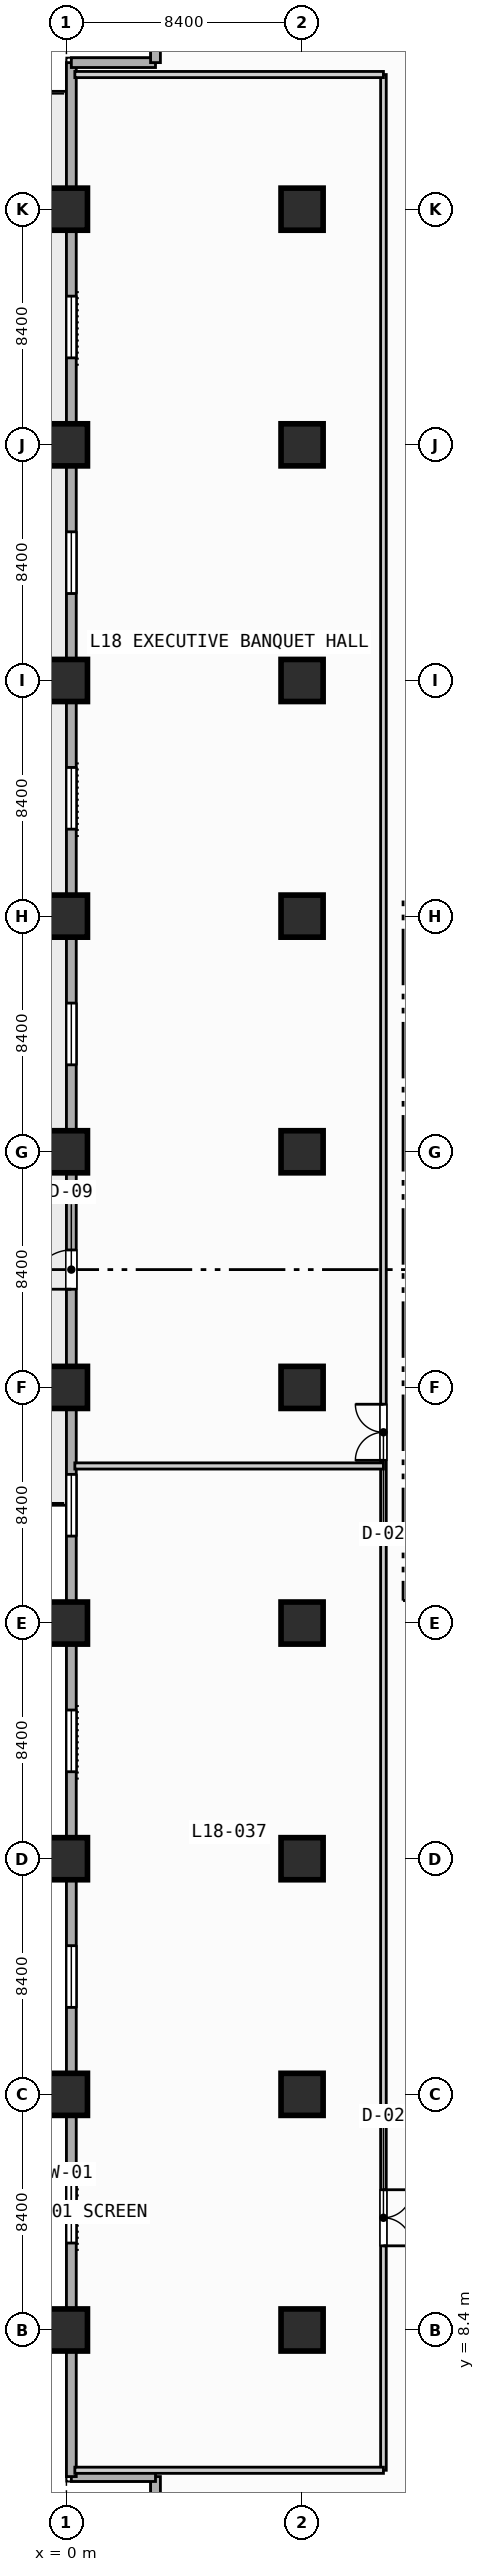
"""IFC4 building model, lengths in metres.
Left out: names, types, materials, properties, quantities, classifications, styles, units other than length and angle.
Written with IfcOpenShell. Run it as: python <this file> out.ifc"""

import sys

from ifc_helpers import new_model, si_unit, direction, frame, frame_2d, origin, origin_2d, place, context, subcontext, project, spatial, rectangle, extrude, element, fill, save


model = new_model("IFC4")
c1 = context("Model", 3, precision=1e-05, world=origin(), true_north=direction((0.0, 1.0)))
c2 = subcontext(c1, "Body", "Model", "MODEL_VIEW")
j1 = project(units=[si_unit("LENGTHUNIT", "METRE"), si_unit("PLANEANGLEUNIT", "RADIAN")], contexts=[c1])
p1 = place(None, origin())
s1 = spatial("IfcSite", under=j1, at=p1, CompositionType="ELEMENT")
p2 = place(p1, origin())
s2 = spatial("IfcBuilding", under=s1, at=p2, CompositionType="ELEMENT")
p3 = place(p2, frame((0.0, 0.0, 77.6)))
s3 = spatial("IfcBuildingStorey", under=s2, at=p3, CompositionType="ELEMENT", Elevation=77.6)
for number, where, z_axis, x_axis in (
    (1, (0.0, 8.4, 0.0), (0.0, 0.0, 1.0), (1.0, 0.0, 0.0)),
    (2, (0.0, 16.8, 0.0), (0.0, 0.0, 1.0), (1.0, 0.0, 0.0)),
    (3, (0.0, 25.2, 0.0), (0.0, 0.0, 1.0), (1.0, 0.0, 0.0)),
    (4, (0.0, 33.6, 0.0), (0.0, 0.0, 1.0), (1.0, 0.0, 0.0)),
    (5, (0.0, 42.0, 0.0), (0.0, 0.0, 1.0), (1.0, 0.0, 0.0)),
    (6, (0.0, 50.4, 0.0), (0.0, 0.0, 1.0), (1.0, 0.0, 0.0)),
    (7, (0.0, 58.8, 0.0), (0.0, 0.0, 1.0), (1.0, 0.0, 0.0)),
    (8, (0.0, 67.2, 0.0), (0.0, 0.0, 1.0), (1.0, 0.0, 0.0)),
    (9, (0.0, 75.6, 0.0), (0.0, 0.0, 1.0), (1.0, 0.0, 0.0)),
    (10, (0.0, 84.0, 0.0), (0.0, 0.0, 1.0), (1.0, 0.0, 0.0)),
    (11, (8.4, 8.4, 0.0), (0.0, 0.0, 1.0), (1.0, 0.0, 0.0)),
    (12, (8.4, 16.8, 0.0), (0.0, 0.0, 1.0), (1.0, 0.0, 0.0)),
    (13, (8.4, 25.2, 0.0), (0.0, 0.0, 1.0), (1.0, 0.0, 0.0)),
    (14, (8.4, 33.6, 0.0), (0.0, 0.0, 1.0), (1.0, 0.0, 0.0)),
    (15, (8.4, 42.0, 0.0), (0.0, 0.0, 1.0), (1.0, 0.0, 0.0)),
    (16, (8.4, 50.4, 0.0), (0.0, 0.0, 1.0), (1.0, 0.0, 0.0)),
    (17, (8.4, 58.8, 0.0), (0.0, 0.0, 1.0), (1.0, 0.0, 0.0)),
    (18, (8.4, 67.2, 0.0), (0.0, 0.0, 1.0), (1.0, 0.0, 0.0)),
    (19, (8.4, 75.6, 0.0), (0.0, 0.0, 1.0), (1.0, 0.0, 0.0)),
    (20, (8.4, 84.0, 0.0), (0.0, 0.0, 1.0), (1.0, 0.0, 0.0)),
):
    element("IfcColumn", number, at=place(p3, frame(where, z_axis=z_axis, x_axis=x_axis)), inside=s3, PredefinedType="COLUMN", context=c2, shape_type="SweptSolid", body=[
        extrude(rectangle(XDim=1.5, YDim=1.5, at=origin_2d()), origin(), (0.0, 0.0, 1.0), 3.8),
    ])
for number, where, z_axis, x_axis in (
    (21, (3.175, 0.175, 0.0), (0.0, 0.0, 1.0), (0.0, 1.0, 0.0)),
    (22, (3.175, 3.175, 0.0), (0.0, 0.0, 1.0), (-1.0, 0.0, 0.0)),
):
    element("IfcWall", number, at=place(p3, frame(where, z_axis=z_axis, x_axis=x_axis)), inside=s3, PredefinedType="STANDARD", context=c2, shape_type="SweptSolid", body=[
        extrude(rectangle(XDim=3.0, YDim=0.35, at=frame_2d((1.5, 0.0))), origin(), (0.0, 0.0, 1.0), 3.55),
    ])
p4 = place(p3, frame((0.175, 3.175, 0.0), z_axis=(0.0, 0.0, 1.0), x_axis=(0.0, 1.0, 0.0)))
e23 = element("IfcWall", 23, at=p4, inside=s3, PredefinedType="STANDARD", context=c2, shape_type="SweptSolid", body=[
    extrude(rectangle(XDim=86.05, YDim=0.35, at=frame_2d((43.025, 0.0))), origin(), (0.0, 0.0, 1.0), 3.55),
])
p5 = place(p4, frame((42.325, 0.0, 0.0)))
e24 = element("IfcOpeningElement", 24, at=p5, cuts=e23, PredefinedType="OPENING", context=c2, shape_type="SweptSolid", body=[
    extrude(rectangle(XDim=1.4, YDim=2.2, at=frame_2d((0.7, 1.1))), frame((0.0, 0.185, 0.0), z_axis=(0.0, -1.0, 0.0), x_axis=(1.0, 0.0, 0.0)), (0.0, 0.0, 1.0), 0.37),
])
p6 = place(p4, frame((8.325, 0.0, 0.85)))
e25 = element("IfcOpeningElement", 25, at=p6, cuts=e23, PredefinedType="OPENING", context=c2, shape_type="SweptSolid", body=[
    extrude(rectangle(XDim=2.2, YDim=1.8, at=frame_2d((1.1, 0.9))), frame((0.0, 0.185, 0.0), z_axis=(0.0, -1.0, 0.0), x_axis=(1.0, 0.0, 0.0)), (0.0, 0.0, 1.0), 0.37),
])
p7 = place(p4, frame((16.725, 0.0, 0.85)))
e26 = element("IfcOpeningElement", 26, at=p7, cuts=e23, PredefinedType="OPENING", context=c2, shape_type="SweptSolid", body=[
    extrude(rectangle(XDim=2.2, YDim=1.8, at=frame_2d((1.1, 0.9))), frame((0.0, 0.185, 0.0), z_axis=(0.0, -1.0, 0.0), x_axis=(1.0, 0.0, 0.0)), (0.0, 0.0, 1.0), 0.37),
])
p8 = place(p4, frame((25.125, 0.0, 0.85)))
e27 = element("IfcOpeningElement", 27, at=p8, cuts=e23, PredefinedType="OPENING", context=c2, shape_type="SweptSolid", body=[
    extrude(rectangle(XDim=2.2, YDim=1.8, at=frame_2d((1.1, 0.9))), frame((0.0, 0.185, 0.0), z_axis=(0.0, -1.0, 0.0), x_axis=(1.0, 0.0, 0.0)), (0.0, 0.0, 1.0), 0.37),
])
p9 = place(p4, frame((33.525, 0.0, 0.85)))
e28 = element("IfcOpeningElement", 28, at=p9, cuts=e23, PredefinedType="OPENING", context=c2, shape_type="SweptSolid", body=[
    extrude(rectangle(XDim=2.2, YDim=1.8, at=frame_2d((1.1, 0.9))), frame((0.0, 0.185, 0.0), z_axis=(0.0, -1.0, 0.0), x_axis=(1.0, 0.0, 0.0)), (0.0, 0.0, 1.0), 0.37),
])
p10 = place(p4, frame((50.325, 0.0, 0.85)))
e29 = element("IfcOpeningElement", 29, at=p10, cuts=e23, PredefinedType="OPENING", context=c2, shape_type="SweptSolid", body=[
    extrude(rectangle(XDim=2.2, YDim=1.8, at=frame_2d((1.1, 0.9))), frame((0.0, 0.185, 0.0), z_axis=(0.0, -1.0, 0.0), x_axis=(1.0, 0.0, 0.0)), (0.0, 0.0, 1.0), 0.37),
])
p11 = place(p4, frame((58.725, 0.0, 0.85)))
e30 = element("IfcOpeningElement", 30, at=p11, cuts=e23, PredefinedType="OPENING", context=c2, shape_type="SweptSolid", body=[
    extrude(rectangle(XDim=2.2, YDim=1.8, at=frame_2d((1.1, 0.9))), frame((0.0, 0.185, 0.0), z_axis=(0.0, -1.0, 0.0), x_axis=(1.0, 0.0, 0.0)), (0.0, 0.0, 1.0), 0.37),
])
p12 = place(p4, frame((67.125, 0.0, 0.85)))
e31 = element("IfcOpeningElement", 31, at=p12, cuts=e23, PredefinedType="OPENING", context=c2, shape_type="SweptSolid", body=[
    extrude(rectangle(XDim=2.2, YDim=1.8, at=frame_2d((1.1, 0.9))), frame((0.0, 0.185, 0.0), z_axis=(0.0, -1.0, 0.0), x_axis=(1.0, 0.0, 0.0)), (0.0, 0.0, 1.0), 0.37),
])
p13 = place(p4, frame((75.525, 0.0, 0.85)))
e32 = element("IfcOpeningElement", 32, at=p13, cuts=e23, PredefinedType="OPENING", context=c2, shape_type="SweptSolid", body=[
    extrude(rectangle(XDim=2.2, YDim=1.8, at=frame_2d((1.1, 0.9))), frame((0.0, 0.185, 0.0), z_axis=(0.0, -1.0, 0.0), x_axis=(1.0, 0.0, 0.0)), (0.0, 0.0, 1.0), 0.37),
])
for number, where, z_axis, x_axis in (
    (33, (0.175, 89.225, 0.0), (0.0, 0.0, 1.0), (1.0, 0.0, 0.0)),
    (34, (3.175, 89.225, 0.0), (0.0, 0.0, 1.0), (0.0, 1.0, 0.0)),
):
    element("IfcWall", number, at=place(p3, frame(where, z_axis=z_axis, x_axis=x_axis)), inside=s3, PredefinedType="STANDARD", context=c2, shape_type="SweptSolid", body=[
        extrude(rectangle(XDim=3.0, YDim=0.35, at=frame_2d((1.5, 0.0))), origin(), (0.0, 0.0, 1.0), 3.55),
    ])
p14 = place(p3, frame((11.3, 3.4, 0.0), z_axis=(0.0, 0.0, 1.0), x_axis=(0.0, 1.0, 0.0)))
e35 = element("IfcWall", 35, at=p14, inside=s3, PredefinedType="PARTITIONING", context=c2, shape_type="SweptSolid", body=[
    extrude(rectangle(XDim=85.4, YDim=0.2, at=frame_2d((42.7, 0.0))), origin(), (0.0, 0.0, 1.0), 3.55),
])
p15 = place(p14, frame((8.0, 0.0, 0.0)))
e36 = element("IfcOpeningElement", 36, at=p15, cuts=e35, PredefinedType="OPENING", context=c2, shape_type="SweptSolid", body=[
    extrude(rectangle(XDim=2.0, YDim=2.15, at=frame_2d((1.0, 1.075))), frame((0.0, 0.11, 0.0), z_axis=(0.0, -1.0, 0.0), x_axis=(1.0, 0.0, 0.0)), (0.0, 0.0, 1.0), 0.22),
])
p16 = place(p14, frame((36.0, 0.0, 0.0)))
e37 = element("IfcOpeningElement", 37, at=p16, cuts=e35, PredefinedType="OPENING", context=c2, shape_type="SweptSolid", body=[
    extrude(rectangle(XDim=2.0, YDim=2.15, at=frame_2d((1.0, 1.075))), frame((0.0, 0.11, 0.0), z_axis=(0.0, -1.0, 0.0), x_axis=(1.0, 0.0, 0.0)), (0.0, 0.0, 1.0), 0.22),
])
for number, where, z_axis, x_axis in (
    (38, (0.3, 3.4, 0.0), (0.0, 0.0, 1.0), (1.0, 0.0, 0.0)),
    (39, (0.3, 39.2, 0.0), (0.0, 0.0, 1.0), (1.0, 0.0, 0.0)),
    (40, (0.3, 88.8, 0.0), (0.0, 0.0, 1.0), (1.0, 0.0, 0.0)),
):
    element("IfcWall", number, at=place(p3, frame(where, z_axis=z_axis, x_axis=x_axis)), inside=s3, PredefinedType="PARTITIONING", context=c2, shape_type="SweptSolid", body=[
        extrude(rectangle(XDim=11.0, YDim=0.22, at=frame_2d((5.5, 0.0))), origin(), (0.0, 0.0, 1.0), 3.55),
    ])
p17 = place(p5, origin())
e41 = element("IfcDoor", 41, at=p17, inside=s3, OperationType="SINGLE_SWING_LEFT", PredefinedType="DOOR", context=c2, shape_type="SweptSolid", body=[
    extrude(rectangle(XDim=1.4, YDim=2.2, at=frame_2d((0.7, 1.1))), frame((0.0, 0.025, 0.0), z_axis=(0.0, -1.0, 0.0), x_axis=(1.0, 0.0, 0.0)), (0.0, 0.0, 1.0), 0.05),
])
fill(e24, e41)
p18 = place(p6, origin())
e42 = element("IfcWindow", 42, at=p18, inside=s3, PartitioningType="SINGLE_PANEL", PredefinedType="WINDOW", context=c2, shape_type="SweptSolid", body=[
    extrude(rectangle(XDim=2.2, YDim=1.8, at=frame_2d((1.1, 0.9))), frame((0.0, 0.03, 0.0), z_axis=(0.0, -1.0, 0.0), x_axis=(1.0, 0.0, 0.0)), (0.0, 0.0, 1.0), 0.06),
])
fill(e25, e42)
p19 = place(p7, origin())
e43 = element("IfcWindow", 43, at=p19, inside=s3, PartitioningType="SINGLE_PANEL", PredefinedType="WINDOW", context=c2, shape_type="SweptSolid", body=[
    extrude(rectangle(XDim=2.2, YDim=1.8, at=frame_2d((1.1, 0.9))), frame((0.0, 0.03, 0.0), z_axis=(0.0, -1.0, 0.0), x_axis=(1.0, 0.0, 0.0)), (0.0, 0.0, 1.0), 0.06),
])
fill(e26, e43)
p20 = place(p8, origin())
e44 = element("IfcWindow", 44, at=p20, inside=s3, PartitioningType="SINGLE_PANEL", PredefinedType="WINDOW", context=c2, shape_type="SweptSolid", body=[
    extrude(rectangle(XDim=2.2, YDim=1.8, at=frame_2d((1.1, 0.9))), frame((0.0, 0.03, 0.0), z_axis=(0.0, -1.0, 0.0), x_axis=(1.0, 0.0, 0.0)), (0.0, 0.0, 1.0), 0.06),
])
fill(e27, e44)
p21 = place(p9, origin())
e45 = element("IfcWindow", 45, at=p21, inside=s3, PartitioningType="SINGLE_PANEL", PredefinedType="WINDOW", context=c2, shape_type="SweptSolid", body=[
    extrude(rectangle(XDim=2.2, YDim=1.8, at=frame_2d((1.1, 0.9))), frame((0.0, 0.03, 0.0), z_axis=(0.0, -1.0, 0.0), x_axis=(1.0, 0.0, 0.0)), (0.0, 0.0, 1.0), 0.06),
])
fill(e28, e45)
p22 = place(p10, origin())
e46 = element("IfcWindow", 46, at=p22, inside=s3, PartitioningType="SINGLE_PANEL", PredefinedType="WINDOW", context=c2, shape_type="SweptSolid", body=[
    extrude(rectangle(XDim=2.2, YDim=1.8, at=frame_2d((1.1, 0.9))), frame((0.0, 0.03, 0.0), z_axis=(0.0, -1.0, 0.0), x_axis=(1.0, 0.0, 0.0)), (0.0, 0.0, 1.0), 0.06),
])
fill(e29, e46)
p23 = place(p11, origin())
e47 = element("IfcWindow", 47, at=p23, inside=s3, PartitioningType="SINGLE_PANEL", PredefinedType="WINDOW", context=c2, shape_type="SweptSolid", body=[
    extrude(rectangle(XDim=2.2, YDim=1.8, at=frame_2d((1.1, 0.9))), frame((0.0, 0.03, 0.0), z_axis=(0.0, -1.0, 0.0), x_axis=(1.0, 0.0, 0.0)), (0.0, 0.0, 1.0), 0.06),
])
fill(e30, e47)
p24 = place(p12, origin())
e48 = element("IfcWindow", 48, at=p24, inside=s3, PartitioningType="SINGLE_PANEL", PredefinedType="WINDOW", context=c2, shape_type="SweptSolid", body=[
    extrude(rectangle(XDim=2.2, YDim=1.8, at=frame_2d((1.1, 0.9))), frame((0.0, 0.03, 0.0), z_axis=(0.0, -1.0, 0.0), x_axis=(1.0, 0.0, 0.0)), (0.0, 0.0, 1.0), 0.06),
])
fill(e31, e48)
p25 = place(p13, origin())
e49 = element("IfcWindow", 49, at=p25, inside=s3, PartitioningType="SINGLE_PANEL", PredefinedType="WINDOW", context=c2, shape_type="SweptSolid", body=[
    extrude(rectangle(XDim=2.2, YDim=1.8, at=frame_2d((1.1, 0.9))), frame((0.0, 0.03, 0.0), z_axis=(0.0, -1.0, 0.0), x_axis=(1.0, 0.0, 0.0)), (0.0, 0.0, 1.0), 0.06),
])
fill(e32, e49)
p26 = place(p15, origin())
e50 = element("IfcDoor", 50, at=p26, inside=s3, OperationType="SINGLE_SWING_RIGHT", PredefinedType="DOOR", context=c2, shape_type="SweptSolid", body=[
    extrude(rectangle(XDim=2.0, YDim=2.15, at=frame_2d((1.0, 1.075))), frame((0.0, 0.025, 0.0), z_axis=(0.0, -1.0, 0.0), x_axis=(1.0, 0.0, 0.0)), (0.0, 0.0, 1.0), 0.05),
])
fill(e36, e50)
p27 = place(p16, origin())
e51 = element("IfcDoor", 51, at=p27, inside=s3, OperationType="SINGLE_SWING_LEFT", PredefinedType="DOOR", context=c2, shape_type="SweptSolid", body=[
    extrude(rectangle(XDim=2.0, YDim=2.15, at=frame_2d((1.0, 1.075))), frame((0.0, 0.025, 0.0), z_axis=(0.0, -1.0, 0.0), x_axis=(1.0, 0.0, 0.0)), (0.0, 0.0, 1.0), 0.05),
])
fill(e37, e51)
save(model, sys.argv[1])
